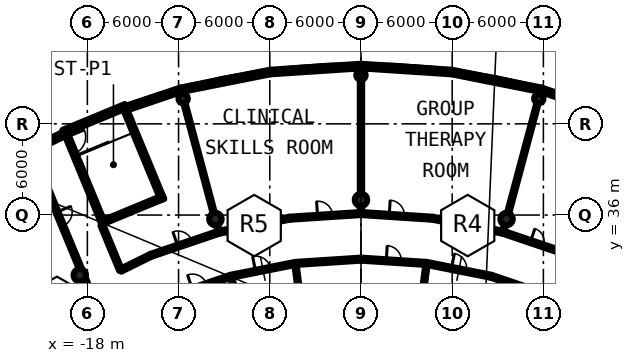
"""IFC4 building model, lengths in metres.
Left out: names, types, materials, properties, quantities, classifications, styles, units other than length and angle.
Written with IfcOpenShell. Run it as: python <this file> out.ifc"""

import sys

from ifc_helpers import new_model, si_unit, direction, frame, frame_2d, origin, origin_2d, place, context, subcontext, project, spatial, rectangle, hollow_circle, extrude, element, fill, save


model = new_model("IFC4")
c1 = context("Model", 3, precision=1e-05, world=origin(), true_north=direction((0.0, 1.0)))
c2 = subcontext(c1, "Body", "Model", "MODEL_VIEW")
j1 = project(units=[si_unit("LENGTHUNIT", "METRE"), si_unit("PLANEANGLEUNIT", "RADIAN")], contexts=[c1])
p1 = place(None, origin())
s1 = spatial("IfcSite", under=j1, at=p1, CompositionType="ELEMENT")
p2 = place(p1, origin())
s2 = spatial("IfcBuilding", under=s1, at=p2, CompositionType="ELEMENT")
p3 = place(p2, frame((0.0, 0.0, 5.4)))
s3 = spatial("IfcBuildingStorey", under=s2, at=p3, CompositionType="ELEMENT", Elevation=5.4)
for number, where, z_axis, x_axis in (
    (1, (9.576, 35.739, 0.0), (0.0, 0.0, 1.0), (1.0, 0.0, 0.0)),
    (2, (0.0, 37.0, 0.0), (0.0, 0.0, 1.0), (1.0, 0.0, 0.0)),
    (3, (-9.576, 35.739, 0.0), (0.0, 0.0, 1.0), (1.0, 0.0, 0.0)),
    (4, (-18.5, 32.043, 0.0), (0.0, 0.0, 1.0), (1.0, 0.0, 0.0)),
):
    element("IfcColumn", number, at=place(p3, frame(where, z_axis=z_axis, x_axis=x_axis)), inside=s3, PredefinedType="COLUMN", context=c2, shape_type="SweptSolid", body=[
        extrude(hollow_circle(Radius=0.406, WallThickness=0.03, at=origin_2d()), origin(), (0.0, 0.0, 1.0), 4.2),
    ])
for number, where, z_axis, x_axis in (
    (5, (11.698, 43.66, 0.0), (0.0, 0.0, 1.0), (1.0, 0.0, 0.0)),
    (6, (0.0, 45.2, 0.0), (0.0, 0.0, 1.0), (1.0, 0.0, 0.0)),
    (7, (-11.698, 43.66, 0.0), (0.0, 0.0, 1.0), (1.0, 0.0, 0.0)),
):
    element("IfcColumn", number, at=place(p3, frame(where, z_axis=z_axis, x_axis=x_axis)), inside=s3, PredefinedType="COLUMN", context=c2, shape_type="SweptSolid", body=[
        extrude(hollow_circle(Radius=0.305, WallThickness=0.025, at=origin_2d()), origin(), (0.0, 0.0, 1.0), 4.2),
    ])
p4 = place(p3, frame((17.527, 42.314, 0.0), z_axis=(0.0, 0.0, 1.0), x_axis=(-0.946966078776, 0.321333542675, 0.0)))
e8 = element("IfcWall", 8, at=p4, inside=s3, PredefinedType="SOLIDWALL", context=c2, shape_type="SweptSolid", body=[
    extrude(rectangle(XDim=5.991, YDim=0.3, at=frame_2d((2.995, 0.0))), origin(), (0.0, 0.0, 1.0), 3.7),
])
p5 = place(p4, frame((1.495, 0.0, 1.0)))
e9 = element("IfcOpeningElement", 9, at=p5, cuts=e8, PredefinedType="OPENING", context=c2, shape_type="SweptSolid", body=[
    extrude(rectangle(XDim=3.0, YDim=2.0, at=frame_2d((1.5, 1.0))), frame((0.0, 0.16, 0.0), z_axis=(0.0, -1.0, 0.0), x_axis=(1.0, 0.0, 0.0)), (0.0, 0.0, 1.0), 0.32),
])
p6 = place(p3, frame((11.854, 44.239, 0.0), z_axis=(0.0, 0.0, 1.0), x_axis=(-0.980780780021, 0.195112945602, 0.0)))
e10 = element("IfcWall", 10, at=p6, inside=s3, PredefinedType="SOLIDWALL", context=c2, shape_type="SweptSolid", body=[
    extrude(rectangle(XDim=5.991, YDim=0.3, at=frame_2d((2.996, 0.0))), origin(), (0.0, 0.0, 1.0), 3.7),
])
p7 = place(p6, frame((1.495, 0.0, 1.0)))
e11 = element("IfcOpeningElement", 11, at=p7, cuts=e10, PredefinedType="OPENING", context=c2, shape_type="SweptSolid", body=[
    extrude(rectangle(XDim=3.0, YDim=2.0, at=frame_2d((1.5, 1.0))), frame((0.0, 0.16, 0.0), z_axis=(0.0, -1.0, 0.0), x_axis=(1.0, 0.0, 0.0)), (0.0, 0.0, 1.0), 0.32),
])
p8 = place(p3, frame((5.978, 45.408, 0.0), z_axis=(0.0, 0.0, 1.0), x_axis=(-0.9978559893, 0.065447877106, 0.0)))
e12 = element("IfcWall", 12, at=p8, inside=s3, PredefinedType="SOLIDWALL", context=c2, shape_type="SweptSolid", body=[
    extrude(rectangle(XDim=5.991, YDim=0.3, at=frame_2d((2.996, 0.0))), origin(), (0.0, 0.0, 1.0), 3.7),
])
p9 = place(p8, frame((1.495, 0.0, 1.0)))
e13 = element("IfcOpeningElement", 13, at=p9, cuts=e12, PredefinedType="OPENING", context=c2, shape_type="SweptSolid", body=[
    extrude(rectangle(XDim=3.0, YDim=2.0, at=frame_2d((1.5, 1.0))), frame((0.0, 0.16, 0.0), z_axis=(0.0, -1.0, 0.0), x_axis=(1.0, 0.0, 0.0)), (0.0, 0.0, 1.0), 0.32),
])
p10 = place(p3, frame((0.0, 45.8, 0.0), z_axis=(0.0, 0.0, 1.0), x_axis=(-0.9978559893, -0.065447877106, 0.0)))
e14 = element("IfcWall", 14, at=p10, inside=s3, PredefinedType="SOLIDWALL", context=c2, shape_type="SweptSolid", body=[
    extrude(rectangle(XDim=5.991, YDim=0.3, at=frame_2d((2.996, 0.0))), origin(), (0.0, 0.0, 1.0), 3.7),
])
p11 = place(p10, frame((1.495, 0.0, 1.0)))
e15 = element("IfcOpeningElement", 15, at=p11, cuts=e14, PredefinedType="OPENING", context=c2, shape_type="SweptSolid", body=[
    extrude(rectangle(XDim=3.0, YDim=2.0, at=frame_2d((1.5, 1.0))), frame((0.0, 0.16, 0.0), z_axis=(0.0, -1.0, 0.0), x_axis=(1.0, 0.0, 0.0)), (0.0, 0.0, 1.0), 0.32),
])
p12 = place(p3, frame((-5.978, 45.408, 0.0), z_axis=(0.0, 0.0, 1.0), x_axis=(-0.980780780021, -0.195112945602, 0.0)))
e16 = element("IfcWall", 16, at=p12, inside=s3, PredefinedType="SOLIDWALL", context=c2, shape_type="SweptSolid", body=[
    extrude(rectangle(XDim=5.991, YDim=0.3, at=frame_2d((2.996, 0.0))), origin(), (0.0, 0.0, 1.0), 3.7),
])
p13 = place(p12, frame((1.495, 0.0, 1.0)))
e17 = element("IfcOpeningElement", 17, at=p13, cuts=e16, PredefinedType="OPENING", context=c2, shape_type="SweptSolid", body=[
    extrude(rectangle(XDim=3.0, YDim=2.0, at=frame_2d((1.5, 1.0))), frame((0.0, 0.16, 0.0), z_axis=(0.0, -1.0, 0.0), x_axis=(1.0, 0.0, 0.0)), (0.0, 0.0, 1.0), 0.32),
])
p14 = place(p3, frame((-11.854, 44.239, 0.0), z_axis=(0.0, 0.0, 1.0), x_axis=(-0.946915897629, -0.321481387979, 0.0)))
e18 = element("IfcWall", 18, at=p14, inside=s3, PredefinedType="SOLIDWALL", context=c2, shape_type="SweptSolid", body=[
    extrude(rectangle(XDim=3.761, YDim=0.3, at=frame_2d((1.88, 0.0))), origin(), (0.0, 0.0, 1.0), 3.7),
])
p15 = place(p3, frame((-19.527, 41.327, 0.0), z_axis=(0.0, 0.0, 1.0), x_axis=(-0.896919197762, -0.44219447383, 0.0)))
e19 = element("IfcWall", 19, at=p15, inside=s3, PredefinedType="SOLIDWALL", context=c2, shape_type="SweptSolid", body=[
    extrude(rectangle(XDim=3.76, YDim=0.3, at=frame_2d((1.88, 0.0))), origin(), (0.0, 0.0, 1.0), 3.7),
])
p16 = place(p3, frame((-19.41, 41.372, 0.0), z_axis=(0.0, 0.0, 1.0), x_axis=(0.382666023753, -0.923886743203, 0.0)))
e20 = element("IfcWall", 20, at=p16, inside=s3, PredefinedType="SHEAR", context=c2, shape_type="SweptSolid", body=[
    extrude(rectangle(XDim=6.45, YDim=0.25, at=frame_2d((3.225, 0.0))), origin(), (0.0, 0.0, 1.0), 4.2),
])
p17 = place(p16, frame((0.25, 0.0, 0.0)))
e21 = element("IfcOpeningElement", 21, at=p17, cuts=e20, PredefinedType="OPENING", context=c2, shape_type="SweptSolid", body=[
    extrude(rectangle(XDim=1.2, YDim=2.3, at=frame_2d((0.6, 1.15))), frame((0.0, 0.135, 0.0), z_axis=(0.0, -1.0, 0.0), x_axis=(1.0, 0.0, 0.0)), (0.0, 0.0, 1.0), 0.27),
])
p18 = place(p3, frame((-13.061, 37.02, 0.0), z_axis=(0.0, 0.0, 1.0), x_axis=(-0.38267940576, 0.923881200375, 0.0)))
e22 = element("IfcWall", 22, at=p18, inside=s3, PredefinedType="SHEAR", context=c2, shape_type="SweptSolid", body=[
    extrude(rectangle(XDim=6.45, YDim=0.25, at=frame_2d((3.225, 0.0))), origin(), (0.0, 0.0, 1.0), 4.2),
])
p19 = place(p3, frame((-12.993, 37.183, 0.0), z_axis=(0.0, 0.0, 1.0), x_axis=(-0.923867048273, -0.382713570591, 0.0)))
e23 = element("IfcWall", 23, at=p19, inside=s3, PredefinedType="SHEAR", context=c2, shape_type="SweptSolid", body=[
    extrude(rectangle(XDim=4.45, YDim=0.25, at=frame_2d((2.225, 0.0))), origin(), (0.0, 0.0, 1.0), 4.2),
])
p20 = place(p3, frame((-15.471, 43.165, 0.0), z_axis=(0.0, 0.0, 1.0), x_axis=(-0.923886445216, -0.382666743194, 0.0)))
e24 = element("IfcWall", 24, at=p20, inside=s3, PredefinedType="SHEAR", context=c2, shape_type="SweptSolid", body=[
    extrude(rectangle(XDim=4.45, YDim=0.3, at=frame_2d((2.225, 0.0))), origin(), (0.0, 0.0, 1.0), 4.2),
])
p21 = place(p3, frame((-21.645, 40.172, 0.0), z_axis=(0.0, 0.0, 1.0), x_axis=(0.382636845375, -0.923898828098, 0.0)))
e25 = element("IfcWall", 25, at=p21, inside=s3, PredefinedType="PARTITIONING", context=c2, shape_type="SweptSolid", body=[
    extrude(rectangle(XDim=8.371, YDim=0.2, at=frame_2d((4.186, 0.0))), origin(), (0.0, 0.0, 1.0), 3.7),
])
p22 = place(p21, frame((4.3, 0.0, 0.0)))
e26 = element("IfcOpeningElement", 26, at=p22, cuts=e25, PredefinedType="OPENING", context=c2, shape_type="SweptSolid", body=[
    extrude(rectangle(XDim=1.0, YDim=2.3, at=frame_2d((0.5, 1.15))), frame((0.0, 0.11, 0.0), z_axis=(0.0, -1.0, 0.0), x_axis=(1.0, 0.0, 0.0)), (0.0, 0.0, 1.0), 0.22),
])
p23 = place(p3, frame((-18.18, 31.804, 0.0), z_axis=(0.0, 0.0, 1.0), x_axis=(0.382827984663, -0.92381964374, 0.0)))
e27 = element("IfcWall", 27, at=p23, inside=s3, PredefinedType="PARTITIONING", context=c2, shape_type="SweptSolid", body=[
    extrude(rectangle(XDim=0.543, YDim=0.2, at=frame_2d((0.272, 0.0))), origin(), (0.0, 0.0, 1.0), 3.7),
])
p24 = place(p3, frame((-17.049, 35.346, 0.0), z_axis=(0.0, 0.0, 1.0), x_axis=(0.382625882863, -0.923903368196, 0.0)))
e28 = element("IfcWall", 28, at=p24, inside=s3, PredefinedType="PARTITIONING", context=c2, shape_type="SweptSolid", body=[
    extrude(rectangle(XDim=3.225, YDim=0.2, at=frame_2d((1.613, 0.0))), origin(), (0.0, 0.0, 1.0), 3.7),
])
p25 = place(p3, frame((3.213, 24.39, 0.0), z_axis=(0.0, 0.0, 1.0), x_axis=(0.130265034912, 0.991479208395, 0.0)))
e29 = element("IfcWall", 29, at=p25, inside=s3, PredefinedType="PARTITIONING", context=c2, shape_type="SweptSolid", body=[
    extrude(rectangle(XDim=8.5, YDim=0.15, at=frame_2d((4.25, 0.0))), origin(), (0.0, 0.0, 1.0), 3.7),
])
p26 = place(p3, frame((-11.62, 43.37, 0.0), z_axis=(0.0, 0.0, 1.0), x_axis=(0.258677511578, -0.965963738969, 0.0)))
e30 = element("IfcWall", 30, at=p26, inside=s3, PredefinedType="PARTITIONING", context=c2, shape_type="SweptSolid", body=[
    extrude(rectangle(XDim=7.5, YDim=0.15, at=frame_2d((3.75, 0.0))), origin(), (0.0, 0.0, 1.0), 3.7),
])
p27 = place(p3, frame((-9.473, 35.353, 0.0), z_axis=(0.0, 0.0, 1.0), x_axis=(0.259728349388, -0.965681720094, 0.0)))
e31 = element("IfcWall", 31, at=p27, inside=s3, PredefinedType="PARTITIONING", context=c2, shape_type="SweptSolid", body=[
    extrude(rectangle(XDim=0.5, YDim=0.15, at=frame_2d((0.25, 0.0))), origin(), (0.0, 0.0, 1.0), 3.7),
])
p28 = place(p3, frame((-8.567, 31.972, 0.0), z_axis=(0.0, 0.0, 1.0), x_axis=(0.258722684363, -0.96595164092, 0.0)))
e32 = element("IfcWall", 32, at=p28, inside=s3, PredefinedType="PARTITIONING", context=c2, shape_type="SweptSolid", body=[
    extrude(rectangle(XDim=8.499, YDim=0.15, at=frame_2d((4.25, 0.0))), origin(), (0.0, 0.0, 1.0), 3.7),
])
p29 = place(p3, frame((-4.32, 32.817, 0.0), z_axis=(0.0, 0.0, 1.0), x_axis=(0.130377980178, -0.991464362589, 0.0)))
e33 = element("IfcWall", 33, at=p29, inside=s3, PredefinedType="PARTITIONING", context=c2, shape_type="SweptSolid", body=[
    extrude(rectangle(XDim=8.5, YDim=0.15, at=frame_2d((4.25, 0.0))), origin(), (0.0, 0.0, 1.0), 3.7),
])
p30 = place(p3, frame((0.0, 36.1, 0.0), z_axis=(0.0, 0.0, 1.0), x_axis=(0.0, 1.0, 0.0)))
e34 = element("IfcWall", 34, at=p30, inside=s3, PredefinedType="PARTITIONING", context=c2, shape_type="SweptSolid", body=[
    extrude(rectangle(XDim=0.493, YDim=0.15, at=frame_2d((0.247, 0.0))), origin(), (0.0, 0.0, 1.0), 3.7),
])
p31 = place(p3, frame((0.0, 37.407, 0.0), z_axis=(0.0, 0.0, 1.0), x_axis=(0.0, 1.0, 0.0)))
e35 = element("IfcWall", 35, at=p31, inside=s3, PredefinedType="PARTITIONING", context=c2, shape_type="SweptSolid", body=[
    extrude(rectangle(XDim=7.488, YDim=0.15, at=frame_2d((3.744, 0.0))), origin(), (0.0, 0.0, 1.0), 3.7),
])
p32 = place(p3, frame((9.341, 34.87, 0.0), z_axis=(0.0, 0.0, 1.0), x_axis=(0.259239435518, 0.965813084956, 0.0)))
e36 = element("IfcWall", 36, at=p32, inside=s3, PredefinedType="PARTITIONING", context=c2, shape_type="SweptSolid", body=[
    extrude(rectangle(XDim=0.501, YDim=0.15, at=frame_2d((0.25, 0.0))), origin(), (0.0, 0.0, 1.0), 3.7),
])
p33 = place(p3, frame((9.678, 36.126, 0.0), z_axis=(0.0, 0.0, 1.0), x_axis=(0.258647138934, 0.965971872013, 0.0)))
e37 = element("IfcWall", 37, at=p33, inside=s3, PredefinedType="PARTITIONING", context=c2, shape_type="SweptSolid", body=[
    extrude(rectangle(XDim=7.5, YDim=0.15, at=frame_2d((3.75, 0.0))), origin(), (0.0, 0.0, 1.0), 3.7),
])
p34 = place(p3, frame((-12.667, 30.58, 0.0), z_axis=(0.0, 0.0, 1.0), x_axis=(0.946926608104, 0.3214498388, 0.0)))
e38 = element("IfcWall", 38, at=p34, inside=s3, PredefinedType="PARTITIONING", context=c2, shape_type="SweptSolid", body=[
    extrude(rectangle(XDim=4.33, YDim=0.2, at=frame_2d((2.165, 0.0))), origin(), (0.0, 0.0, 1.0), 3.7),
])
p35 = place(p34, frame((1.665, 0.0, 0.0)))
e39 = element("IfcOpeningElement", 39, at=p35, cuts=e38, PredefinedType="OPENING", context=c2, shape_type="SweptSolid", body=[
    extrude(rectangle(XDim=1.0, YDim=2.3, at=frame_2d((0.5, 1.15))), frame((0.0, 0.11, 0.0), z_axis=(0.0, -1.0, 0.0), x_axis=(1.0, 0.0, 0.0)), (0.0, 0.0, 1.0), 0.22),
])
p36 = place(p3, frame((-8.567, 31.972, 0.0), z_axis=(0.0, 0.0, 1.0), x_axis=(0.980775360662, 0.195140185298, 0.0)))
e40 = element("IfcWall", 40, at=p36, inside=s3, PredefinedType="PARTITIONING", context=c2, shape_type="SweptSolid", body=[
    extrude(rectangle(XDim=4.33, YDim=0.2, at=frame_2d((2.165, 0.0))), origin(), (0.0, 0.0, 1.0), 3.7),
])
p37 = place(p36, frame((1.665, 0.0, 0.0)))
e41 = element("IfcOpeningElement", 41, at=p37, cuts=e40, PredefinedType="OPENING", context=c2, shape_type="SweptSolid", body=[
    extrude(rectangle(XDim=1.0, YDim=2.3, at=frame_2d((0.5, 1.15))), frame((0.0, 0.11, 0.0), z_axis=(0.0, -1.0, 0.0), x_axis=(1.0, 0.0, 0.0)), (0.0, 0.0, 1.0), 0.22),
])
p38 = place(p3, frame((-4.32, 32.817, 0.0), z_axis=(0.0, 0.0, 1.0), x_axis=(0.997858156097, 0.065414832499, 0.0)))
e42 = element("IfcWall", 42, at=p38, inside=s3, PredefinedType="PARTITIONING", context=c2, shape_type="SweptSolid", body=[
    extrude(rectangle(XDim=4.329, YDim=0.2, at=frame_2d((2.165, 0.0))), origin(), (0.0, 0.0, 1.0), 3.7),
])
p39 = place(p3, frame((0.0, 33.1, 0.0), z_axis=(0.0, 0.0, 1.0), x_axis=(0.997858156097, -0.065414832499, 0.0)))
e43 = element("IfcWall", 43, at=p39, inside=s3, PredefinedType="PARTITIONING", context=c2, shape_type="SweptSolid", body=[
    extrude(rectangle(XDim=4.329, YDim=0.2, at=frame_2d((2.165, 0.0))), origin(), (0.0, 0.0, 1.0), 3.7),
])
p40 = place(p39, frame((1.665, 0.0, 0.0)))
e44 = element("IfcOpeningElement", 44, at=p40, cuts=e43, PredefinedType="OPENING", context=c2, shape_type="SweptSolid", body=[
    extrude(rectangle(XDim=1.0, YDim=2.3, at=frame_2d((0.5, 1.15))), frame((0.0, 0.11, 0.0), z_axis=(0.0, -1.0, 0.0), x_axis=(1.0, 0.0, 0.0)), (0.0, 0.0, 1.0), 0.22),
])
p41 = place(p3, frame((4.32, 32.817, 0.0), z_axis=(0.0, 0.0, 1.0), x_axis=(0.980775360662, -0.195140185298, 0.0)))
e45 = element("IfcWall", 45, at=p41, inside=s3, PredefinedType="PARTITIONING", context=c2, shape_type="SweptSolid", body=[
    extrude(rectangle(XDim=4.33, YDim=0.2, at=frame_2d((2.165, 0.0))), origin(), (0.0, 0.0, 1.0), 3.7),
])
p42 = place(p41, frame((1.665, 0.0, 0.0)))
e46 = element("IfcOpeningElement", 46, at=p42, cuts=e45, PredefinedType="OPENING", context=c2, shape_type="SweptSolid", body=[
    extrude(rectangle(XDim=1.0, YDim=2.3, at=frame_2d((0.5, 1.15))), frame((0.0, 0.11, 0.0), z_axis=(0.0, -1.0, 0.0), x_axis=(1.0, 0.0, 0.0)), (0.0, 0.0, 1.0), 0.22),
])
p43 = place(p3, frame((8.567, 31.972, 0.0), z_axis=(0.0, 0.0, 1.0), x_axis=(0.946926608104, -0.3214498388, 0.0)))
e47 = element("IfcWall", 47, at=p43, inside=s3, PredefinedType="PARTITIONING", context=c2, shape_type="SweptSolid", body=[
    extrude(rectangle(XDim=4.33, YDim=0.2, at=frame_2d((2.165, 0.0))), origin(), (0.0, 0.0, 1.0), 3.7),
])
p44 = place(p3, frame((-15.815, 32.366, 0.0), z_axis=(0.0, 0.0, 1.0), x_axis=(0.896909538441, 0.442214065645, 0.0)))
e48 = element("IfcWall", 48, at=p44, inside=s3, PredefinedType="PARTITIONING", context=c2, shape_type="SweptSolid", body=[
    extrude(rectangle(XDim=2.23, YDim=0.2, at=frame_2d((1.115, 0.0))), origin(), (0.0, 0.0, 1.0), 3.7),
])
p45 = place(p3, frame((-13.815, 33.352, 0.0), z_axis=(0.0, 0.0, 1.0), x_axis=(0.946926725229, 0.321449493775, 0.0)))
e49 = element("IfcWall", 49, at=p45, inside=s3, PredefinedType="PARTITIONING", context=c2, shape_type="SweptSolid", body=[
    extrude(rectangle(XDim=4.723, YDim=0.2, at=frame_2d((2.361, 0.0))), origin(), (0.0, 0.0, 1.0), 3.7),
])
p46 = place(p45, frame((1.861, 0.0, 0.0)))
e50 = element("IfcOpeningElement", 50, at=p46, cuts=e49, PredefinedType="OPENING", context=c2, shape_type="SweptSolid", body=[
    extrude(rectangle(XDim=1.0, YDim=2.3, at=frame_2d((0.5, 1.15))), frame((0.0, 0.11, 0.0), z_axis=(0.0, -1.0, 0.0), x_axis=(1.0, 0.0, 0.0)), (0.0, 0.0, 1.0), 0.22),
])
p47 = place(p3, frame((-9.343, 34.87, 0.0), z_axis=(0.0, 0.0, 1.0), x_axis=(0.980796841032, 0.195032193809, 0.0)))
e51 = element("IfcWall", 51, at=p47, inside=s3, PredefinedType="PARTITIONING", context=c2, shape_type="SweptSolid", body=[
    extrude(rectangle(XDim=4.722, YDim=0.2, at=frame_2d((2.361, 0.0))), origin(), (0.0, 0.0, 1.0), 3.7),
])
p48 = place(p3, frame((-4.712, 35.791, 0.0), z_axis=(0.0, 0.0, 1.0), x_axis=(0.997855509942, 0.065455185264, 0.0)))
e52 = element("IfcWall", 52, at=p48, inside=s3, PredefinedType="PARTITIONING", context=c2, shape_type="SweptSolid", body=[
    extrude(rectangle(XDim=4.722, YDim=0.2, at=frame_2d((2.361, 0.0))), origin(), (0.0, 0.0, 1.0), 3.7),
])
p49 = place(p48, frame((1.861, 0.0, 0.0)))
e53 = element("IfcOpeningElement", 53, at=p49, cuts=e52, PredefinedType="OPENING", context=c2, shape_type="SweptSolid", body=[
    extrude(rectangle(XDim=1.0, YDim=2.3, at=frame_2d((0.5, 1.15))), frame((0.0, 0.11, 0.0), z_axis=(0.0, -1.0, 0.0), x_axis=(1.0, 0.0, 0.0)), (0.0, 0.0, 1.0), 0.22),
])
p50 = place(p3, frame((0.0, 36.1, 0.0), z_axis=(0.0, 0.0, 1.0), x_axis=(0.997855509942, -0.065455185264, 0.0)))
e54 = element("IfcWall", 54, at=p50, inside=s3, PredefinedType="PARTITIONING", context=c2, shape_type="SweptSolid", body=[
    extrude(rectangle(XDim=4.722, YDim=0.2, at=frame_2d((2.361, 0.0))), origin(), (0.0, 0.0, 1.0), 3.7),
])
p51 = place(p50, frame((1.861, 0.0, 0.0)))
e55 = element("IfcOpeningElement", 55, at=p51, cuts=e54, PredefinedType="OPENING", context=c2, shape_type="SweptSolid", body=[
    extrude(rectangle(XDim=1.0, YDim=2.3, at=frame_2d((0.5, 1.15))), frame((0.0, 0.11, 0.0), z_axis=(0.0, -1.0, 0.0), x_axis=(1.0, 0.0, 0.0)), (0.0, 0.0, 1.0), 0.22),
])
p52 = place(p3, frame((4.712, 35.791, 0.0), z_axis=(0.0, 0.0, 1.0), x_axis=(0.980796841032, -0.195032193809, 0.0)))
e56 = element("IfcWall", 56, at=p52, inside=s3, PredefinedType="PARTITIONING", context=c2, shape_type="SweptSolid", body=[
    extrude(rectangle(XDim=4.722, YDim=0.2, at=frame_2d((2.361, 0.0))), origin(), (0.0, 0.0, 1.0), 3.7),
])
p53 = place(p3, frame((9.343, 34.87, 0.0), z_axis=(0.0, 0.0, 1.0), x_axis=(0.946926725229, -0.321449493775, 0.0)))
e57 = element("IfcWall", 57, at=p53, inside=s3, PredefinedType="PARTITIONING", context=c2, shape_type="SweptSolid", body=[
    extrude(rectangle(XDim=4.723, YDim=0.2, at=frame_2d((2.361, 0.0))), origin(), (0.0, 0.0, 1.0), 3.7),
])
p54 = place(p53, frame((1.911, 0.0, 0.0)))
e58 = element("IfcOpeningElement", 58, at=p54, cuts=e57, PredefinedType="OPENING", context=c2, shape_type="SweptSolid", body=[
    extrude(rectangle(XDim=0.9, YDim=2.3, at=frame_2d((0.45, 1.15))), frame((0.0, 0.11, 0.0), z_axis=(0.0, -1.0, 0.0), x_axis=(1.0, 0.0, 0.0)), (0.0, 0.0, 1.0), 0.22),
])
p55 = place(p7, origin())
e59 = element("IfcWindow", 59, at=p55, inside=s3, PartitioningType="SINGLE_PANEL", PredefinedType="WINDOW", context=c2, shape_type="SweptSolid", body=[
    extrude(rectangle(XDim=3.0, YDim=2.0, at=frame_2d((1.5, 1.0))), frame((0.0, 0.03, 0.0), z_axis=(0.0, -1.0, 0.0), x_axis=(1.0, 0.0, 0.0)), (0.0, 0.0, 1.0), 0.06),
])
fill(e11, e59)
p56 = place(p9, origin())
e60 = element("IfcWindow", 60, at=p56, inside=s3, PartitioningType="SINGLE_PANEL", PredefinedType="WINDOW", context=c2, shape_type="SweptSolid", body=[
    extrude(rectangle(XDim=3.0, YDim=2.0, at=frame_2d((1.5, 1.0))), frame((0.0, 0.03, 0.0), z_axis=(0.0, -1.0, 0.0), x_axis=(1.0, 0.0, 0.0)), (0.0, 0.0, 1.0), 0.06),
])
fill(e13, e60)
p57 = place(p11, origin())
e61 = element("IfcWindow", 61, at=p57, inside=s3, PartitioningType="SINGLE_PANEL", PredefinedType="WINDOW", context=c2, shape_type="SweptSolid", body=[
    extrude(rectangle(XDim=3.0, YDim=2.0, at=frame_2d((1.5, 1.0))), frame((0.0, 0.03, 0.0), z_axis=(0.0, -1.0, 0.0), x_axis=(1.0, 0.0, 0.0)), (0.0, 0.0, 1.0), 0.06),
])
fill(e15, e61)
p58 = place(p13, origin())
e62 = element("IfcWindow", 62, at=p58, inside=s3, PartitioningType="SINGLE_PANEL", PredefinedType="WINDOW", context=c2, shape_type="SweptSolid", body=[
    extrude(rectangle(XDim=3.0, YDim=2.0, at=frame_2d((1.5, 1.0))), frame((0.0, 0.03, 0.0), z_axis=(0.0, -1.0, 0.0), x_axis=(1.0, 0.0, 0.0)), (0.0, 0.0, 1.0), 0.06),
])
fill(e17, e62)
p59 = place(p17, origin())
e63 = element("IfcDoor", 63, at=p59, inside=s3, OperationType="SINGLE_SWING_RIGHT", PredefinedType="DOOR", context=c2, shape_type="SweptSolid", body=[
    extrude(rectangle(XDim=1.2, YDim=2.3, at=frame_2d((0.6, 1.15))), frame((0.0, 0.025, 0.0), z_axis=(0.0, -1.0, 0.0), x_axis=(1.0, 0.0, 0.0)), (0.0, 0.0, 1.0), 0.05),
])
fill(e21, e63)
p60 = place(p42, origin())
e64 = element("IfcDoor", 64, at=p60, inside=s3, OperationType="SINGLE_SWING_LEFT", PredefinedType="DOOR", context=c2, shape_type="SweptSolid", body=[
    extrude(rectangle(XDim=1.0, YDim=2.3, at=frame_2d((0.5, 1.15))), frame((0.0, 0.025, 0.0), z_axis=(0.0, -1.0, 0.0), x_axis=(1.0, 0.0, 0.0)), (0.0, 0.0, 1.0), 0.05),
])
fill(e46, e64)
p61 = place(p40, origin())
e65 = element("IfcDoor", 65, at=p61, inside=s3, OperationType="SINGLE_SWING_RIGHT", PredefinedType="DOOR", context=c2, shape_type="SweptSolid", body=[
    extrude(rectangle(XDim=1.0, YDim=2.3, at=frame_2d((0.5, 1.15))), frame((0.0, 0.025, 0.0), z_axis=(0.0, -1.0, 0.0), x_axis=(1.0, 0.0, 0.0)), (0.0, 0.0, 1.0), 0.05),
])
fill(e44, e65)
p62 = place(p37, origin())
e66 = element("IfcDoor", 66, at=p62, inside=s3, OperationType="SINGLE_SWING_RIGHT", PredefinedType="DOOR", context=c2, shape_type="SweptSolid", body=[
    extrude(rectangle(XDim=1.0, YDim=2.3, at=frame_2d((0.5, 1.15))), frame((0.0, 0.025, 0.0), z_axis=(0.0, -1.0, 0.0), x_axis=(1.0, 0.0, 0.0)), (0.0, 0.0, 1.0), 0.05),
])
fill(e41, e66)
p63 = place(p54, origin())
e67 = element("IfcDoor", 67, at=p63, inside=s3, OperationType="SINGLE_SWING_RIGHT", PredefinedType="DOOR", context=c2, shape_type="SweptSolid", body=[
    extrude(rectangle(XDim=0.9, YDim=2.3, at=frame_2d((0.45, 1.15))), frame((0.0, 0.025, 0.0), z_axis=(0.0, -1.0, 0.0), x_axis=(1.0, 0.0, 0.0)), (0.0, 0.0, 1.0), 0.05),
])
fill(e58, e67)
p64 = place(p51, origin())
e68 = element("IfcDoor", 68, at=p64, inside=s3, OperationType="SINGLE_SWING_RIGHT", PredefinedType="DOOR", context=c2, shape_type="SweptSolid", body=[
    extrude(rectangle(XDim=1.0, YDim=2.3, at=frame_2d((0.5, 1.15))), frame((0.0, 0.025, 0.0), z_axis=(0.0, -1.0, 0.0), x_axis=(1.0, 0.0, 0.0)), (0.0, 0.0, 1.0), 0.05),
])
fill(e55, e68)
p65 = place(p49, origin())
e69 = element("IfcDoor", 69, at=p65, inside=s3, OperationType="SINGLE_SWING_LEFT", PredefinedType="DOOR", context=c2, shape_type="SweptSolid", body=[
    extrude(rectangle(XDim=1.0, YDim=2.3, at=frame_2d((0.5, 1.15))), frame((0.0, 0.025, 0.0), z_axis=(0.0, -1.0, 0.0), x_axis=(1.0, 0.0, 0.0)), (0.0, 0.0, 1.0), 0.05),
])
fill(e53, e69)
p66 = place(p46, origin())
e70 = element("IfcDoor", 70, at=p66, inside=s3, OperationType="SINGLE_SWING_LEFT", PredefinedType="DOOR", context=c2, shape_type="SweptSolid", body=[
    extrude(rectangle(XDim=1.0, YDim=2.3, at=frame_2d((0.5, 1.15))), frame((0.0, 0.025, 0.0), z_axis=(0.0, -1.0, 0.0), x_axis=(1.0, 0.0, 0.0)), (0.0, 0.0, 1.0), 0.05),
])
fill(e50, e70)
p67 = place(p22, origin())
e71 = element("IfcDoor", 71, at=p67, inside=s3, OperationType="SINGLE_SWING_RIGHT", PredefinedType="DOOR", context=c2, shape_type="SweptSolid", body=[
    extrude(rectangle(XDim=1.0, YDim=2.3, at=frame_2d((0.5, 1.15))), frame((0.0, 0.025, 0.0), z_axis=(0.0, -1.0, 0.0), x_axis=(1.0, 0.0, 0.0)), (0.0, 0.0, 1.0), 0.05),
])
fill(e26, e71)
save(model, sys.argv[1])
